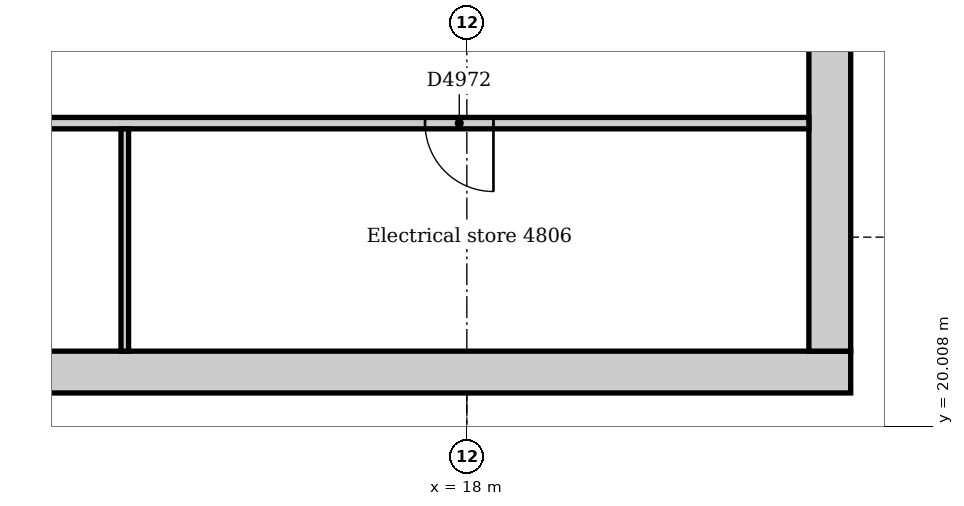
"""IFC4 building model, lengths in metres.
Left out: names, types, materials, properties, quantities, classifications, styles, units other than length and angle.
Written with IfcOpenShell. Run it as: python <this file> out.ifc"""

import sys

from ifc_helpers import new_model, si_unit, direction, frame, frame_2d, origin, place, context, subcontext, project, spatial, rectangle, extrude, element, fill, save


model = new_model("IFC4")
c1 = context("Model", 3, precision=1e-05, world=origin(), true_north=direction((0.0, 1.0)))
c2 = subcontext(c1, "Body", "Model", "MODEL_VIEW")
j1 = project(units=[si_unit("LENGTHUNIT", "METRE"), si_unit("PLANEANGLEUNIT", "RADIAN")], contexts=[c1])
p1 = place(None, origin())
s1 = spatial("IfcSite", under=j1, at=p1, CompositionType="ELEMENT")
p2 = place(p1, origin())
s2 = spatial("IfcBuilding", under=s1, at=p2, CompositionType="ELEMENT")
p3 = place(p2, frame((0.0, 0.0, 202.0)))
s3 = spatial("IfcBuildingStorey", under=s2, at=p3, CompositionType="ELEMENT", Elevation=202.0)
p4 = place(p3, frame((3.95, 20.725, 0.0), z_axis=(0.0, 0.0, 1.0), x_axis=(1.0, 0.0, 0.0)))
e1 = element("IfcWall", 1, at=p4, inside=s3, PredefinedType="SOLIDWALL", context=c2, shape_type="SweptSolid", body=[
    extrude(rectangle(XDim=19.1, YDim=0.55, at=frame_2d((9.55, 0.0))), origin(), (0.0, 0.0, 1.0), 4.0),
])
p5 = place(p3, frame((22.775, 21.0, 0.0), z_axis=(0.0, 0.0, 1.0), x_axis=(0.0, 1.0, 0.0)))
e2 = element("IfcWall", 2, at=p5, inside=s3, PredefinedType="SOLIDWALL", context=c2, shape_type="SweptSolid", body=[
    extrude(rectangle(XDim=10.5, YDim=0.55, at=frame_2d((5.25, 0.0))), origin(), (0.0, 0.0, 1.0), 4.0),
])
p6 = place(p5, frame((4.35, 0.0, 0.0)))
e3 = element("IfcOpeningElement", 3, at=p6, cuts=e2, PredefinedType="OPENING", context=c2, shape_type="SweptSolid", body=[
    extrude(rectangle(XDim=1.8, YDim=2.1, at=frame_2d((0.9, 1.05))), frame((0.0, 0.285, 0.0), z_axis=(0.0, -1.0, 0.0), x_axis=(1.0, 0.0, 0.0)), (0.0, 0.0, 1.0), 0.57),
])
p7 = place(p3, frame((4.5, 24.0, 0.0), z_axis=(0.0, 0.0, 1.0), x_axis=(1.0, 0.0, 0.0)))
e4 = element("IfcWall", 4, at=p7, inside=s3, PredefinedType="PARTITIONING", context=c2, shape_type="SweptSolid", body=[
    extrude(rectangle(XDim=18.0, YDim=0.15, at=frame_2d((9.0, 0.0))), origin(), (0.0, 0.0, 1.0), 3.85),
])
p8 = place(p7, frame((1.1, 0.0, 0.0)))
e5 = element("IfcOpeningElement", 5, at=p8, cuts=e4, PredefinedType="OPENING", context=c2, shape_type="SweptSolid", body=[
    extrude(rectangle(XDim=0.9, YDim=2.1, at=frame_2d((0.45, 1.05))), frame((0.0, 0.085, 0.0), z_axis=(0.0, -1.0, 0.0), x_axis=(1.0, 0.0, 0.0)), (0.0, 0.0, 1.0), 0.17),
])
p9 = place(p7, frame((5.55, 0.0, 0.0)))
e6 = element("IfcOpeningElement", 6, at=p9, cuts=e4, PredefinedType="OPENING", context=c2, shape_type="SweptSolid", body=[
    extrude(rectangle(XDim=0.9, YDim=2.1, at=frame_2d((0.45, 1.05))), frame((0.0, 0.085, 0.0), z_axis=(0.0, -1.0, 0.0), x_axis=(1.0, 0.0, 0.0)), (0.0, 0.0, 1.0), 0.17),
])
p10 = place(p7, frame((12.95, 0.0, 0.0)))
e7 = element("IfcOpeningElement", 7, at=p10, cuts=e4, PredefinedType="OPENING", context=c2, shape_type="SweptSolid", body=[
    extrude(rectangle(XDim=0.9, YDim=2.1, at=frame_2d((0.45, 1.05))), frame((0.0, 0.085, 0.0), z_axis=(0.0, -1.0, 0.0), x_axis=(1.0, 0.0, 0.0)), (0.0, 0.0, 1.0), 0.17),
])
p11 = place(p3, frame((13.5, 21.0, 0.0), z_axis=(0.0, 0.0, 1.0), x_axis=(0.0, 1.0, 0.0)))
e8 = element("IfcWall", 8, at=p11, inside=s3, PredefinedType="PARTITIONING", context=c2, shape_type="SweptSolid", body=[
    extrude(rectangle(XDim=2.925, YDim=0.1, at=frame_2d((1.462, 0.0))), origin(), (0.0, 0.0, 1.0), 3.85),
])
p12 = place(p10, frame((0.9, 0.0, 0.0), z_axis=(0.0, 0.0, 1.0), x_axis=(-1.0, 0.0, 0.0)))
e9 = element("IfcDoor", 9, at=p12, inside=s3, OperationType="SINGLE_SWING_LEFT", PredefinedType="DOOR", context=c2, shape_type="SweptSolid", body=[
    extrude(rectangle(XDim=0.9, YDim=2.1, at=frame_2d((0.45, 1.05))), frame((0.0, 0.025, 0.0), z_axis=(0.0, -1.0, 0.0), x_axis=(1.0, 0.0, 0.0)), (0.0, 0.0, 1.0), 0.05),
])
fill(e7, e9)
save(model, sys.argv[1])
